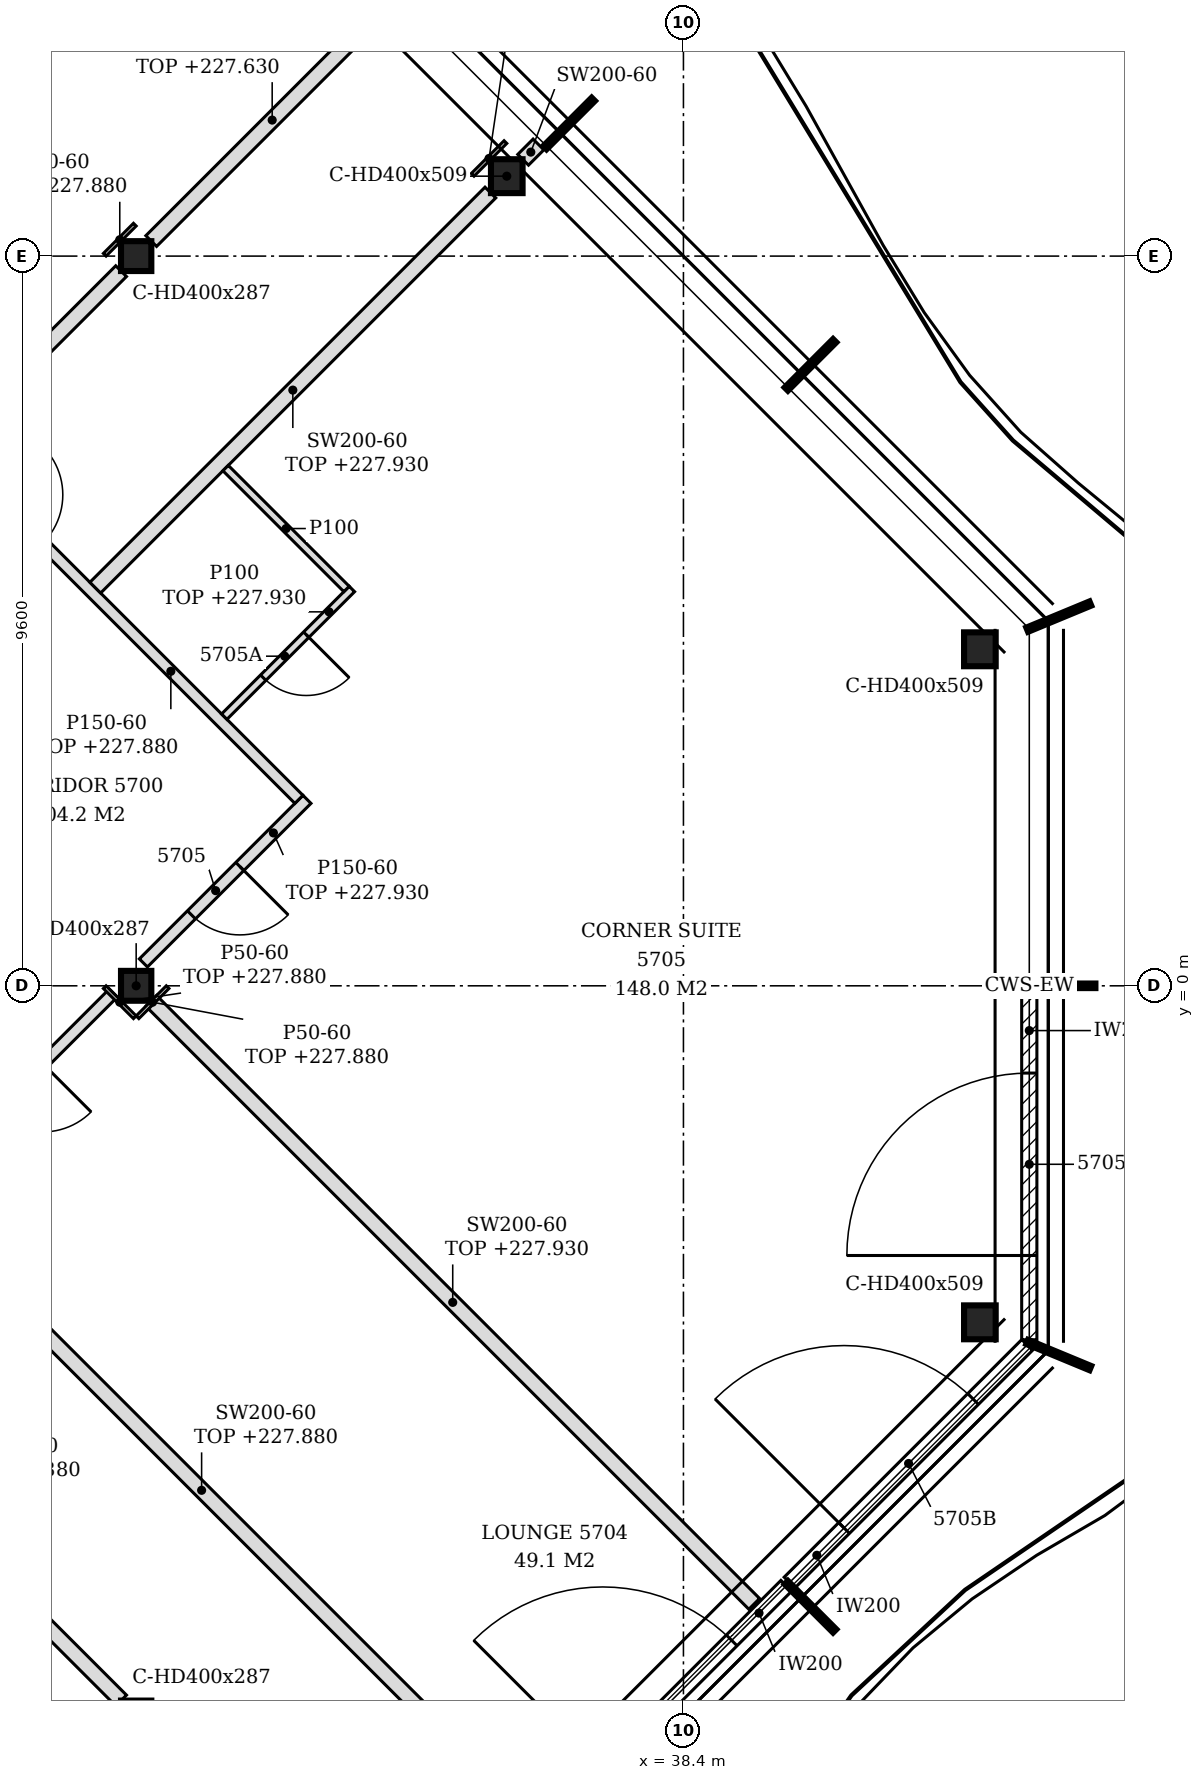
"""IFC4 building model, lengths in metres.
Left out: names, types, materials, properties, quantities, classifications, styles, units other than length and angle.
Written with IfcOpenShell. Run it as: python <this file> out.ifc"""

import sys

from ifc_helpers import new_model, si_unit, direction, frame, frame_2d, origin, origin_2d, place, context, subcontext, project, spatial, rectangle, i_section, extrude, element, fill, save


model = new_model("IFC4")
c1 = context("Model", 3, precision=1e-05, world=origin(), true_north=direction((0.0, 1.0)))
c2 = subcontext(c1, "Body", "Model", "MODEL_VIEW")
j1 = project(units=[si_unit("LENGTHUNIT", "METRE"), si_unit("PLANEANGLEUNIT", "RADIAN")], contexts=[c1])
p1 = place(None, origin())
s1 = spatial("IfcSite", under=j1, at=p1, CompositionType="ELEMENT")
p2 = place(p1, origin())
s2 = spatial("IfcBuilding", under=s1, at=p2, CompositionType="ELEMENT")
p3 = place(p2, frame((0.0, 0.0, 225.0)))
s3 = spatial("IfcBuildingStorey", under=s2, at=p3, CompositionType="ELEMENT", Elevation=225.0)
for number, where, z_axis, x_axis in (
    (1, (42.3, -4.427, -0.15), (0.0, 0.0, 1.0), (1.0, 0.0, 0.0)),
    (2, (42.3, 4.427, -0.15), (0.0, 0.0, 1.0), (1.0, 0.0, 0.0)),
    (3, (36.076, 10.652, -0.15), (0.0, 0.0, 1.0), (1.0, 0.0, 0.0)),
):
    element("IfcColumn", number, at=place(p3, frame(where, z_axis=z_axis, x_axis=x_axis)), inside=s3, PredefinedType="COLUMN", context=c2, shape_type="SweptSolid", body=[
        extrude(i_section(OverallWidth=0.416, OverallDepth=0.446, WebThickness=0.039, FlangeThickness=0.063, FilletRadius=0.015, at=origin_2d()), origin(), (0.0, 0.0, 1.0), 3.6),
    ])
for number, where, z_axis, x_axis in (
    (4, (31.2, 0.0, -0.15), (0.0, 0.0, 1.0), (1.0, 0.0, 0.0)),
    (5, (31.2, 9.6, -0.15), (0.0, 0.0, 1.0), (1.0, 0.0, 0.0)),
):
    element("IfcColumn", number, at=place(p3, frame(where, z_axis=z_axis, x_axis=x_axis)), inside=s3, PredefinedType="COLUMN", context=c2, shape_type="SweptSolid", body=[
        extrude(i_section(OverallWidth=0.399, OverallDepth=0.393, WebThickness=0.023, FlangeThickness=0.037, FilletRadius=0.015, at=origin_2d()), origin(), (0.0, 0.0, 1.0), 3.6),
    ])
p4 = place(p3, frame((36.62, -11.026, 0.0), z_axis=(0.0, 0.0, 1.0), x_axis=(0.707106781187, 0.707106781187, 0.0)))
e6 = element("IfcWall", 6, at=p4, inside=s3, PredefinedType="NOTDEFINED", context=c2, shape_type="SweptSolid", body=[
    extrude(rectangle(XDim=4.431, YDim=0.2, at=frame_2d((2.215, 0.0))), origin(), (0.0, 0.0, 1.0), 3.45),
])
p5 = place(p4, frame((1.015, 0.0, 0.0)))
e7 = element("IfcOpeningElement", 7, at=p5, cuts=e6, PredefinedType="OPENING", context=c2, shape_type="SweptSolid", body=[
    extrude(rectangle(XDim=2.4, YDim=2.4, at=frame_2d((1.2, 1.2))), frame((0.0, 0.11, 0.0), z_axis=(0.0, -1.0, 0.0), x_axis=(1.0, 0.0, 0.0)), (0.0, 0.0, 1.0), 0.22),
])
p6 = place(p3, frame((39.796, -7.851, 0.0), z_axis=(0.0, 0.0, 1.0), x_axis=(0.707079168996, 0.707134392299, 0.0)))
e8 = element("IfcWall", 8, at=p6, inside=s3, PredefinedType="NOTDEFINED", context=c2, shape_type="SweptSolid", body=[
    extrude(rectangle(XDim=4.421, YDim=0.2, at=frame_2d((2.21, 0.0))), origin(), (0.0, 0.0, 1.0), 3.45),
])
p7 = place(p6, frame((1.015, 0.0, 0.0)))
e9 = element("IfcOpeningElement", 9, at=p7, cuts=e8, PredefinedType="OPENING", context=c2, shape_type="SweptSolid", body=[
    extrude(rectangle(XDim=2.4, YDim=2.4, at=frame_2d((1.2, 1.2))), frame((0.0, 0.11, 0.0), z_axis=(0.0, -1.0, 0.0), x_axis=(1.0, 0.0, 0.0)), (0.0, 0.0, 1.0), 0.22),
])
p8 = place(p3, frame((42.95, -4.656, 0.0), z_axis=(0.0, 0.0, 1.0), x_axis=(0.0, 1.0, 0.0)))
e10 = element("IfcWall", 10, at=p8, inside=s3, PredefinedType="NOTDEFINED", context=c2, shape_type="SweptSolid", body=[
    extrude(rectangle(XDim=4.626, YDim=0.2, at=frame_2d((2.313, 0.0))), origin(), (0.0, 0.0, 1.0), 3.45),
])
p9 = place(p8, frame((1.108, 0.0, 0.0)))
e11 = element("IfcOpeningElement", 11, at=p9, cuts=e10, PredefinedType="OPENING", context=c2, shape_type="SweptSolid", body=[
    extrude(rectangle(XDim=2.4, YDim=2.4, at=frame_2d((1.2, 1.2))), frame((0.0, 0.11, 0.0), z_axis=(0.0, -1.0, 0.0), x_axis=(1.0, 0.0, 0.0)), (0.0, 0.0, 1.0), 0.22),
])
p10 = place(p3, frame((16.722, -14.272, 0.0), z_axis=(0.0, 0.0, 1.0), x_axis=(0.707106781187, 0.707106781187, 0.0)))
e12 = element("IfcWall", 12, at=p10, inside=s3, PredefinedType="PARTITIONING", context=c2, shape_type="SweptSolid", body=[
    extrude(rectangle(XDim=20.049, YDim=0.15, at=frame_2d((10.025, 0.0))), origin(), (0.0, 0.0, 1.0), 2.73),
])
p11 = place(p10, frame((4.892, 0.0, 0.0)))
e13 = element("IfcOpeningElement", 13, at=p11, cuts=e12, PredefinedType="OPENING", context=c2, shape_type="SweptSolid", body=[
    extrude(rectangle(XDim=0.9, YDim=2.1, at=frame_2d((0.45, 1.05))), frame((0.0, 0.085, 0.0), z_axis=(0.0, -1.0, 0.0), x_axis=(1.0, 0.0, 0.0)), (0.0, 0.0, 1.0), 0.17),
])
p12 = place(p10, frame((10.042, 0.0, 0.0)))
e14 = element("IfcOpeningElement", 14, at=p12, cuts=e12, PredefinedType="OPENING", context=c2, shape_type="SweptSolid", body=[
    extrude(rectangle(XDim=0.9, YDim=2.1, at=frame_2d((0.45, 1.05))), frame((0.0, 0.085, 0.0), z_axis=(0.0, -1.0, 0.0), x_axis=(1.0, 0.0, 0.0)), (0.0, 0.0, 1.0), 0.17),
])
p13 = place(p10, frame((14.443, 0.0, 0.0)))
e15 = element("IfcOpeningElement", 15, at=p13, cuts=e12, PredefinedType="OPENING", context=c2, shape_type="SweptSolid", body=[
    extrude(rectangle(XDim=0.9, YDim=2.1, at=frame_2d((0.45, 1.05))), frame((0.0, 0.085, 0.0), z_axis=(0.0, -1.0, 0.0), x_axis=(1.0, 0.0, 0.0)), (0.0, 0.0, 1.0), 0.17),
])
p14 = place(p10, frame((17.837, 0.0, 0.0)))
e16 = element("IfcOpeningElement", 16, at=p14, cuts=e12, PredefinedType="OPENING", context=c2, shape_type="SweptSolid", body=[
    extrude(rectangle(XDim=0.9, YDim=2.1, at=frame_2d((0.45, 1.05))), frame((0.0, 0.085, 0.0), z_axis=(0.0, -1.0, 0.0), x_axis=(1.0, 0.0, 0.0)), (0.0, 0.0, 1.0), 0.17),
])
p15 = place(p3, frame((35.86, -10.436, 0.0), z_axis=(0.0, 0.0, 1.0), x_axis=(-0.707106781187, 0.707106781187, 0.0)))
e17 = element("IfcWall", 17, at=p15, inside=s3, PredefinedType="PARTITIONING", context=c2, shape_type="SweptSolid", body=[
    extrude(rectangle(XDim=10.745, YDim=0.2, at=frame_2d((5.373, 0.0))), origin(), (0.0, 0.0, 1.0), 2.88),
])
p16 = place(p3, frame((31.002, -9.402, 0.0), z_axis=(0.0, 0.0, 1.0), x_axis=(-0.707088226093, 0.707125335793, 0.0)))
e18 = element("IfcWall", 18, at=p16, inside=s3, PredefinedType="PARTITIONING", context=c2, shape_type="SweptSolid", body=[
    extrude(rectangle(XDim=6.579, YDim=0.2, at=frame_2d((3.29, 0.0))), origin(), (0.0, 0.0, 1.0), 2.88),
])
p17 = place(p3, frame((39.331, -8.131, 0.0), z_axis=(0.0, 0.0, 1.0), x_axis=(-0.707106781187, 0.707106781187, 0.0)))
e19 = element("IfcWall", 19, at=p17, inside=s3, PredefinedType="PARTITIONING", context=c2, shape_type="SweptSolid", body=[
    extrude(rectangle(XDim=11.219, YDim=0.2, at=frame_2d((5.61, 0.0))), origin(), (0.0, 0.0, 1.0), 2.93),
])
p18 = place(p3, frame((31.295, 0.301, 0.0), z_axis=(0.0, 0.0, 1.0), x_axis=(0.707146890479, 0.707066669618, 0.0)))
e20 = element("IfcWall", 20, at=p18, inside=s3, PredefinedType="PARTITIONING", context=c2, shape_type="SweptSolid", body=[
    extrude(rectangle(XDim=3.043, YDim=0.15, at=frame_2d((1.522, 0.0))), origin(), (0.0, 0.0, 1.0), 2.93),
])
p19 = place(p18, frame((0.895, 0.0, 0.0)))
e21 = element("IfcOpeningElement", 21, at=p19, cuts=e20, PredefinedType="OPENING", context=c2, shape_type="SweptSolid", body=[
    extrude(rectangle(XDim=0.9, YDim=2.1, at=frame_2d((0.45, 1.05))), frame((0.0, 0.085, 0.0), z_axis=(0.0, -1.0, 0.0), x_axis=(1.0, 0.0, 0.0)), (0.0, 0.0, 1.0), 0.17),
])
p20 = place(p3, frame((33.341, 2.453, 0.0), z_axis=(0.0, 0.0, 1.0), x_axis=(-0.707098652635, 0.707114909645, 0.0)))
e22 = element("IfcWall", 22, at=p20, inside=s3, PredefinedType="PARTITIONING", context=c2, shape_type="SweptSolid", body=[
    extrude(rectangle(XDim=15.018, YDim=0.15, at=frame_2d((7.509, 0.0))), origin(), (0.0, 0.0, 1.0), 2.88),
])
p21 = place(p20, frame((4.766, 0.0, 0.0)))
e23 = element("IfcOpeningElement", 23, at=p21, cuts=e22, PredefinedType="OPENING", context=c2, shape_type="SweptSolid", body=[
    extrude(rectangle(XDim=0.9, YDim=2.1, at=frame_2d((0.45, 1.05))), frame((0.0, 0.085, 0.0), z_axis=(0.0, -1.0, 0.0), x_axis=(1.0, 0.0, 0.0)), (0.0, 0.0, 1.0), 0.17),
])
p22 = place(p20, frame((9.167, 0.0, 0.0)))
e24 = element("IfcOpeningElement", 24, at=p22, cuts=e22, PredefinedType="OPENING", context=c2, shape_type="SweptSolid", body=[
    extrude(rectangle(XDim=0.9, YDim=2.1, at=frame_2d((0.45, 1.05))), frame((0.0, 0.085, 0.0), z_axis=(0.0, -1.0, 0.0), x_axis=(1.0, 0.0, 0.0)), (0.0, 0.0, 1.0), 0.17),
])
p23 = place(p20, frame((13.482, 0.0, 0.0)))
e25 = element("IfcOpeningElement", 25, at=p23, cuts=e22, PredefinedType="OPENING", context=c2, shape_type="SweptSolid", body=[
    extrude(rectangle(XDim=0.9, YDim=2.1, at=frame_2d((0.45, 1.05))), frame((0.0, 0.085, 0.0), z_axis=(0.0, -1.0, 0.0), x_axis=(1.0, 0.0, 0.0)), (0.0, 0.0, 1.0), 0.17),
])
p24 = place(p3, frame((32.359, 3.541, 0.0), z_axis=(0.0, 0.0, 1.0), x_axis=(0.707158179099, 0.707055379538, 0.0)))
e26 = element("IfcWall", 26, at=p24, inside=s3, PredefinedType="PARTITIONING", context=c2, shape_type="SweptSolid", body=[
    extrude(rectangle(XDim=2.375, YDim=0.1, at=frame_2d((1.188, 0.0))), origin(), (0.0, 0.0, 1.0), 2.93),
])
p25 = place(p24, frame((0.725, 0.0, 0.0)))
e27 = element("IfcOpeningElement", 27, at=p25, cuts=e26, PredefinedType="OPENING", context=c2, shape_type="SweptSolid", body=[
    extrude(rectangle(XDim=0.8, YDim=2.1, at=frame_2d((0.4, 1.05))), frame((0.0, 0.06, 0.0), z_axis=(0.0, -1.0, 0.0), x_axis=(1.0, 0.0, 0.0)), (0.0, 0.0, 1.0), 0.12),
])
p26 = place(p3, frame((30.662, 5.238, 0.0), z_axis=(0.0, 0.0, 1.0), x_axis=(0.707106781187, 0.707106781187, 0.0)))
e28 = element("IfcWall", 28, at=p26, inside=s3, PredefinedType="PARTITIONING", context=c2, shape_type="SweptSolid", body=[
    extrude(rectangle(XDim=7.351, YDim=0.2, at=frame_2d((3.676, 0.0))), origin(), (0.0, 0.0, 1.0), 2.93),
])
p27 = place(p3, frame((33.968, 5.22, 0.0), z_axis=(0.0, 0.0, 1.0), x_axis=(-0.707106781187, 0.707106781187, 0.0)))
e29 = element("IfcWall", 29, at=p27, inside=s3, PredefinedType="PARTITIONING", context=c2, shape_type="SweptSolid", body=[
    extrude(rectangle(XDim=2.25, YDim=0.1, at=frame_2d((1.125, 0.0))), origin(), (0.0, 0.0, 1.0), 3.45),
])
p28 = place(p3, frame((28.75, 7.15, 0.0), z_axis=(0.0, 0.0, 1.0), x_axis=(0.7070684525, 0.707145107796, 0.0)))
e30 = element("IfcWall", 30, at=p28, inside=s3, PredefinedType="PARTITIONING", context=c2, shape_type="SweptSolid", body=[
    extrude(rectangle(XDim=3.185, YDim=0.2, at=frame_2d((1.592, 0.0))), origin(), (0.0, 0.0, 1.0), 2.93),
])
p29 = place(p3, frame((31.398, 9.798, 0.0), z_axis=(0.0, 0.0, 1.0), x_axis=(0.707133900936, 0.707079660397, 0.0)))
e31 = element("IfcWall", 31, at=p29, inside=s3, PredefinedType="PARTITIONING", context=c2, shape_type="SweptSolid", body=[
    extrude(rectangle(XDim=4.501, YDim=0.2, at=frame_2d((2.25, 0.0))), origin(), (0.0, 0.0, 1.0), 2.63),
])
p30 = place(p3, frame((36.291, 10.867, 0.0), z_axis=(0.0, 0.0, 1.0), x_axis=(0.707534423513, 0.706678880075, 0.0)))
e32 = element("IfcWall", 32, at=p30, inside=s3, PredefinedType="PARTITIONING", context=c2, shape_type="SweptSolid", body=[
    extrude(rectangle(XDim=0.285, YDim=0.2, at=frame_2d((0.143, 0.0))), origin(), (0.0, 0.0, 1.0), 3.45),
])
for number, where, z_axis, x_axis in (
    (33, (31.218, -0.414, 0.0), (0.0, 0.0, 1.0), (0.707, 0.707, 0.0)),
    (34, (31.182, -0.414, 0.0), (0.0, 0.0, 1.0), (-0.707, 0.707, 0.0)),
):
    element("IfcWall", number, at=place(p3, frame(where, z_axis=z_axis, x_axis=x_axis)), inside=s3, PredefinedType="PARTITIONING", context=c2, shape_type="SweptSolid", body=[
        extrude(rectangle(XDim=0.56, YDim=0.05, at=frame_2d((0.28, 0.0))), origin(), (0.0, 0.0, 1.0), 2.88),
    ])
p31 = place(p3, frame((35.627, 10.669, 0.0), z_axis=(0.0, 0.0, 1.0), x_axis=(0.707307009627, 0.706906496032, 0.0)))
e35 = element("IfcWall", 35, at=p31, inside=s3, PredefinedType="PARTITIONING", context=c2, shape_type="SweptSolid", body=[
    extrude(rectangle(XDim=0.61, YDim=0.05, at=frame_2d((0.305, 0.0))), origin(), (0.0, 0.0, 1.0), 2.63),
])
p32 = place(p3, frame((30.786, 9.618, 0.0), z_axis=(0.0, 0.0, 1.0), x_axis=(0.707106781187, 0.707106781187, 0.0)))
e36 = element("IfcWall", 36, at=p32, inside=s3, PredefinedType="PARTITIONING", context=c2, shape_type="SweptSolid", body=[
    extrude(rectangle(XDim=0.56, YDim=0.05, at=frame_2d((0.28, 0.0))), origin(), (0.0, 0.0, 1.0), 2.88),
])
p33 = place(p5, origin())
e37 = element("IfcDoor", 37, at=p33, inside=s3, OperationType="SINGLE_SWING_LEFT", PredefinedType="DOOR", context=c2, shape_type="SweptSolid", body=[
    extrude(rectangle(XDim=2.4, YDim=2.4, at=frame_2d((1.2, 1.2))), frame((0.0, 0.025, 0.0), z_axis=(0.0, -1.0, 0.0), x_axis=(1.0, 0.0, 0.0)), (0.0, 0.0, 1.0), 0.05),
])
fill(e7, e37)
p34 = place(p7, origin())
e38 = element("IfcDoor", 38, at=p34, inside=s3, OperationType="SINGLE_SWING_LEFT", PredefinedType="DOOR", context=c2, shape_type="SweptSolid", body=[
    extrude(rectangle(XDim=2.4, YDim=2.4, at=frame_2d((1.2, 1.2))), frame((0.0, 0.025, 0.0), z_axis=(0.0, -1.0, 0.0), x_axis=(1.0, 0.0, 0.0)), (0.0, 0.0, 1.0), 0.05),
])
fill(e9, e38)
p35 = place(p9, origin())
e39 = element("IfcDoor", 39, at=p35, inside=s3, OperationType="SINGLE_SWING_LEFT", PredefinedType="DOOR", context=c2, shape_type="SweptSolid", body=[
    extrude(rectangle(XDim=2.4, YDim=2.4, at=frame_2d((1.2, 1.2))), frame((0.0, 0.025, 0.0), z_axis=(0.0, -1.0, 0.0), x_axis=(1.0, 0.0, 0.0)), (0.0, 0.0, 1.0), 0.05),
])
fill(e11, e39)
p36 = place(p19, frame((0.9, 0.0, 0.0), z_axis=(0.0, 0.0, 1.0), x_axis=(-1.0, 0.0, 0.0)))
e40 = element("IfcDoor", 40, at=p36, inside=s3, OperationType="SINGLE_SWING_LEFT", PredefinedType="DOOR", context=c2, shape_type="SweptSolid", body=[
    extrude(rectangle(XDim=0.9, YDim=2.1, at=frame_2d((0.45, 1.05))), frame((0.0, 0.025, 0.0), z_axis=(0.0, -1.0, 0.0), x_axis=(1.0, 0.0, 0.0)), (0.0, 0.0, 1.0), 0.05),
])
fill(e21, e40)
p37 = place(p25, frame((0.8, 0.0, 0.0), z_axis=(0.0, 0.0, 1.0), x_axis=(-1.0, 0.0, 0.0)))
e41 = element("IfcDoor", 41, at=p37, inside=s3, OperationType="SINGLE_SWING_LEFT", PredefinedType="DOOR", context=c2, shape_type="SweptSolid", body=[
    extrude(rectangle(XDim=0.8, YDim=2.1, at=frame_2d((0.4, 1.05))), frame((0.0, 0.025, 0.0), z_axis=(0.0, -1.0, 0.0), x_axis=(1.0, 0.0, 0.0)), (0.0, 0.0, 1.0), 0.05),
])
fill(e27, e41)
save(model, sys.argv[1])
